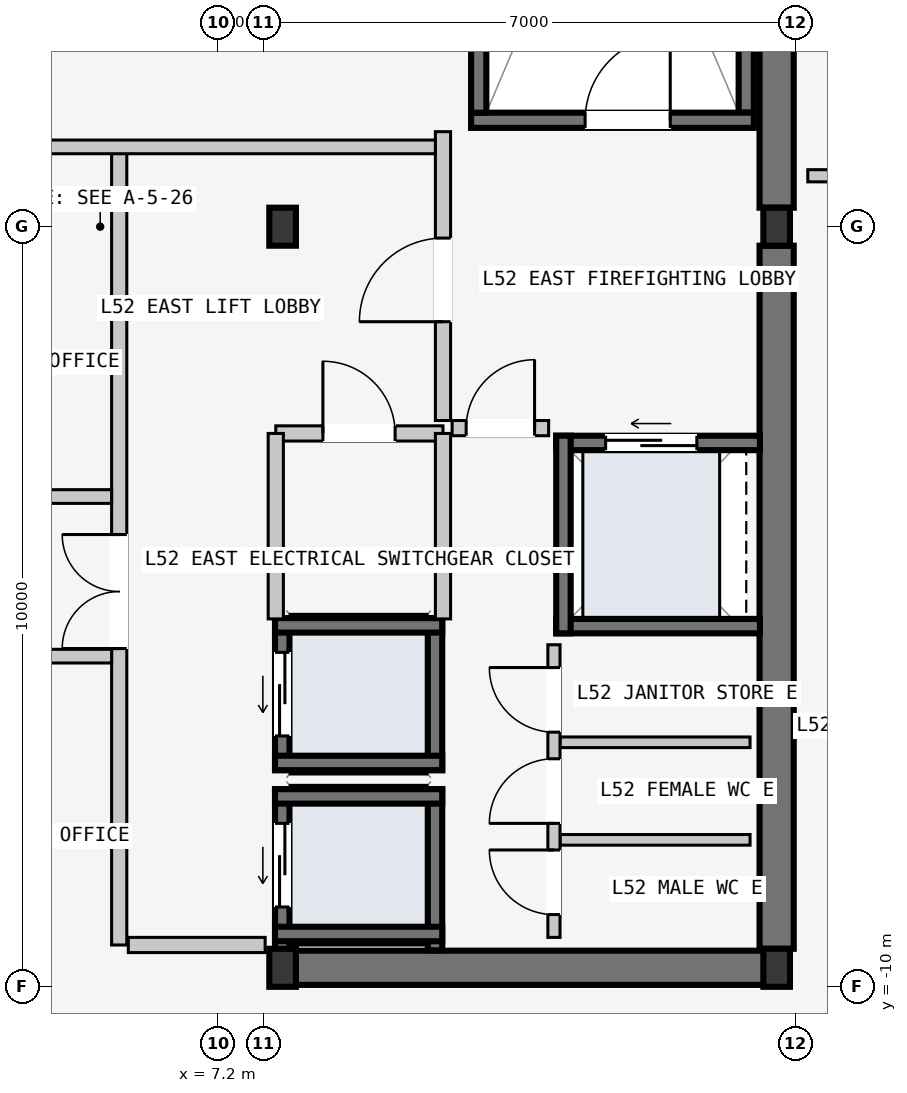
"""IFC4 building model, lengths in metres.
Left out: names, types, materials, properties, quantities, classifications, styles, units other than length and angle.
Written with IfcOpenShell. Run it as: python <this file> out.ifc"""

import sys

from ifc_helpers import new_model, si_unit, direction, frame, frame_2d, origin, origin_2d, place, context, subcontext, project, spatial, rectangle, i_section, extrude, element, fill, save


model = new_model("IFC4")
c1 = context("Model", 3, precision=1e-05, world=origin(), true_north=direction((0.0, 1.0)))
c2 = subcontext(c1, "Body", "Model", "MODEL_VIEW")
j1 = project(units=[si_unit("LENGTHUNIT", "METRE"), si_unit("PLANEANGLEUNIT", "RADIAN")], contexts=[c1])
p1 = place(None, origin())
s1 = spatial("IfcSite", under=j1, at=p1, CompositionType="ELEMENT")
p2 = place(p1, origin())
s2 = spatial("IfcBuilding", under=s1, at=p2, CompositionType="ELEMENT")
p3 = place(p2, frame((0.0, 0.0, 198.3)))
s3 = spatial("IfcBuildingStorey", under=s2, at=p3, CompositionType="ELEMENT", Elevation=198.3)
p4 = place(p3, frame((8.07, -9.75, -0.2), z_axis=(0.0, 0.0, 1.0), x_axis=(1.0, 0.0, 0.0)))
e1 = element("IfcWall", 1, at=p4, inside=s3, PredefinedType="SHEAR", context=c2, shape_type="SweptSolid", body=[
    extrude(rectangle(XDim=6.46, YDim=0.45, at=frame_2d((3.23, 0.0))), origin(), (0.0, 0.0, 1.0), 3.6),
])
for number, where, z_axis, x_axis in (
    (2, (14.55, -9.5, -0.2), (0.0, 0.0, 1.0), (0.0, 1.0, 0.0)),
    (3, (14.55, 0.25, -0.2), (0.0, 0.0, 1.0), (0.0, 1.0, 0.0)),
):
    element("IfcWall", number, at=place(p3, frame(where, z_axis=z_axis, x_axis=x_axis)), inside=s3, PredefinedType="SHEAR", context=c2, shape_type="SweptSolid", body=[
        extrude(rectangle(XDim=9.25, YDim=0.45, at=frame_2d((4.625, 0.0))), origin(), (0.0, 0.0, 1.0), 3.6),
    ])
p5 = place(p3, frame((14.15, 1.5, -0.2), z_axis=(0.0, 0.0, 1.0), x_axis=(0.0, 1.0, 0.0)))
e4 = element("IfcWall", 4, at=p5, inside=s3, PredefinedType="SOLIDWALL", context=c2, shape_type="SweptSolid", body=[
    extrude(rectangle(XDim=7.8, YDim=0.2, at=frame_2d((3.9, 0.0))), origin(), (0.0, 0.0, 1.0), 3.6),
])
p6 = place(p3, frame((10.53, 1.4, -0.2), z_axis=(0.0, 0.0, 1.0), x_axis=(1.0, 0.0, 0.0)))
e5 = element("IfcWall", 5, at=p6, inside=s3, PredefinedType="SOLIDWALL", context=c2, shape_type="SweptSolid", body=[
    extrude(rectangle(XDim=3.72, YDim=0.2, at=frame_2d((1.86, 0.0))), origin(), (0.0, 0.0, 1.0), 3.6),
])
p7 = place(p6, frame((1.5, 0.0, 0.2)))
e6 = element("IfcOpeningElement", 6, at=p7, cuts=e5, PredefinedType="OPENING", context=c2, shape_type="SweptSolid", body=[
    extrude(rectangle(XDim=1.12, YDim=2.18, at=frame_2d((0.56, 1.09))), frame((0.0, 0.11, 0.0), z_axis=(0.0, -1.0, 0.0), x_axis=(1.0, 0.0, 0.0)), (0.0, 0.0, 1.0), 0.22),
])
p8 = place(p3, frame((10.63, 1.5, -0.2), z_axis=(0.0, 0.0, 1.0), x_axis=(0.0, 1.0, 0.0)))
e7 = element("IfcWall", 7, at=p8, inside=s3, PredefinedType="SOLIDWALL", context=c2, shape_type="SweptSolid", body=[
    extrude(rectangle(XDim=7.8, YDim=0.2, at=frame_2d((3.9, 0.0))), origin(), (0.0, 0.0, 1.0), 3.6),
])
for number, where, z_axis, x_axis in (
    (8, (8.05, -9.75, 0.0), (0.0, 0.0, 1.0), (1.0, 0.0, 0.0)),
    (9, (8.05, 0.0, 0.0), (0.0, 0.0, 1.0), (1.0, 0.0, 0.0)),
    (10, (14.55, -9.75, 0.0), (0.0, 0.0, 1.0), (1.0, 0.0, 0.0)),
    (11, (14.55, 0.0, 0.0), (0.0, 0.0, 1.0), (1.0, 0.0, 0.0)),
):
    element("IfcColumn", number, at=place(p3, frame(where, z_axis=z_axis, x_axis=x_axis)), inside=s3, PredefinedType="COLUMN", context=c2, shape_type="SweptSolid", body=[
        extrude(i_section(OverallWidth=0.35, OverallDepth=0.5, WebThickness=0.02, FlangeThickness=0.032, at=origin_2d()), origin(), (0.0, 0.0, 1.0), 3.6),
    ])
p9 = place(p3, frame((8.045, -9.52, -0.2), z_axis=(0.0, 0.0, 1.0), x_axis=(0.0, 1.0, 0.0)))
e12 = element("IfcWall", 12, at=p9, inside=s3, PredefinedType="SOLIDWALL", context=c2, shape_type="SweptSolid", body=[
    extrude(rectangle(XDim=2.12, YDim=0.19, at=frame_2d((1.06, 0.0))), origin(), (0.0, 0.0, 1.0), 3.6),
])
p10 = place(p9, frame((0.57, 0.0, 0.2)))
e13 = element("IfcOpeningElement", 13, at=p10, cuts=e12, PredefinedType="OPENING", context=c2, shape_type="SweptSolid", body=[
    extrude(rectangle(XDim=1.1, YDim=2.2, at=frame_2d((0.55, 1.1))), frame((0.0, 0.105, 0.0), z_axis=(0.0, -1.0, 0.0), x_axis=(1.0, 0.0, 0.0)), (0.0, 0.0, 1.0), 0.21),
])
p11 = place(p3, frame((10.055, -9.52, -0.2), z_axis=(0.0, 0.0, 1.0), x_axis=(0.0, 1.0, 0.0)))
e14 = element("IfcWall", 14, at=p11, inside=s3, PredefinedType="SOLIDWALL", context=c2, shape_type="SweptSolid", body=[
    extrude(rectangle(XDim=2.12, YDim=0.19, at=frame_2d((1.06, 0.0))), origin(), (0.0, 0.0, 1.0), 3.6),
])
for number, where, z_axis, x_axis in (
    (15, (7.95, -7.495, -0.2), (0.0, 0.0, 1.0), (1.0, 0.0, 0.0)),
    (16, (7.95, -9.305, -0.2), (0.0, 0.0, 1.0), (1.0, 0.0, 0.0)),
):
    element("IfcWall", number, at=place(p3, frame(where, z_axis=z_axis, x_axis=x_axis)), inside=s3, PredefinedType="SOLIDWALL", context=c2, shape_type="SweptSolid", body=[
        extrude(rectangle(XDim=2.2, YDim=0.19, at=frame_2d((1.1, 0.0))), origin(), (0.0, 0.0, 1.0), 3.6),
    ])
p12 = place(p3, frame((8.045, -7.15, -0.2), z_axis=(0.0, 0.0, 1.0), x_axis=(0.0, 1.0, 0.0)))
e17 = element("IfcWall", 17, at=p12, inside=s3, PredefinedType="SOLIDWALL", context=c2, shape_type="SweptSolid", body=[
    extrude(rectangle(XDim=2.0, YDim=0.19, at=frame_2d((1.0, 0.0))), origin(), (0.0, 0.0, 1.0), 3.6),
])
p13 = place(p12, frame((0.45, 0.0, 0.2)))
e18 = element("IfcOpeningElement", 18, at=p13, cuts=e17, PredefinedType="OPENING", context=c2, shape_type="SweptSolid", body=[
    extrude(rectangle(XDim=1.1, YDim=2.2, at=frame_2d((0.55, 1.1))), frame((0.0, 0.105, 0.0), z_axis=(0.0, -1.0, 0.0), x_axis=(1.0, 0.0, 0.0)), (0.0, 0.0, 1.0), 0.21),
])
p14 = place(p3, frame((10.055, -7.15, -0.2), z_axis=(0.0, 0.0, 1.0), x_axis=(0.0, 1.0, 0.0)))
e19 = element("IfcWall", 19, at=p14, inside=s3, PredefinedType="SOLIDWALL", context=c2, shape_type="SweptSolid", body=[
    extrude(rectangle(XDim=2.0, YDim=0.19, at=frame_2d((1.0, 0.0))), origin(), (0.0, 0.0, 1.0), 3.6),
])
for number, where, z_axis, x_axis in (
    (20, (7.95, -5.245, -0.2), (0.0, 0.0, 1.0), (1.0, 0.0, 0.0)),
    (21, (7.95, -7.055, -0.2), (0.0, 0.0, 1.0), (1.0, 0.0, 0.0)),
):
    element("IfcWall", number, at=place(p3, frame(where, z_axis=z_axis, x_axis=x_axis)), inside=s3, PredefinedType="SOLIDWALL", context=c2, shape_type="SweptSolid", body=[
        extrude(rectangle(XDim=2.2, YDim=0.19, at=frame_2d((1.1, 0.0))), origin(), (0.0, 0.0, 1.0), 3.6),
    ])
p15 = place(p3, frame((11.65, -2.845, -0.2), z_axis=(0.0, 0.0, 1.0), x_axis=(1.0, 0.0, 0.0)))
e22 = element("IfcWall", 22, at=p15, inside=s3, PredefinedType="SOLIDWALL", context=c2, shape_type="SweptSolid", body=[
    extrude(rectangle(XDim=2.68, YDim=0.19, at=frame_2d((1.34, 0.0))), origin(), (0.0, 0.0, 1.0), 3.6),
])
p16 = place(p15, frame((0.65, 0.0, 0.2)))
e23 = element("IfcOpeningElement", 23, at=p16, cuts=e22, PredefinedType="OPENING", context=c2, shape_type="SweptSolid", body=[
    extrude(rectangle(XDim=1.2, YDim=2.2, at=frame_2d((0.6, 1.1))), frame((0.0, 0.105, 0.0), z_axis=(0.0, -1.0, 0.0), x_axis=(1.0, 0.0, 0.0)), (0.0, 0.0, 1.0), 0.21),
])
p17 = place(p3, frame((11.65, -5.255, -0.2), z_axis=(0.0, 0.0, 1.0), x_axis=(1.0, 0.0, 0.0)))
e24 = element("IfcWall", 24, at=p17, inside=s3, PredefinedType="SOLIDWALL", context=c2, shape_type="SweptSolid", body=[
    extrude(rectangle(XDim=2.68, YDim=0.19, at=frame_2d((1.34, 0.0))), origin(), (0.0, 0.0, 1.0), 3.6),
])
p18 = place(p3, frame((11.745, -5.35, -0.2), z_axis=(0.0, 0.0, 1.0), x_axis=(0.0, 1.0, 0.0)))
e25 = element("IfcWall", 25, at=p18, inside=s3, PredefinedType="SOLIDWALL", context=c2, shape_type="SweptSolid", body=[
    extrude(rectangle(XDim=2.6, YDim=0.19, at=frame_2d((1.3, 0.0))), origin(), (0.0, 0.0, 1.0), 3.6),
])
p19 = place(p3, frame((5.9, -9.45, 0.0), z_axis=(0.0, 0.0, 1.0), x_axis=(0.0, 1.0, 0.0)))
e26 = element("IfcWall", 26, at=p19, inside=s3, PredefinedType="PARTITIONING", context=c2, shape_type="SweptSolid", body=[
    extrude(rectangle(XDim=10.5, YDim=0.2, at=frame_2d((5.25, 0.0))), origin(), (0.0, 0.0, 1.0), 3.4),
])
p20 = place(p19, frame((3.9, 0.0, 0.0)))
e27 = element("IfcOpeningElement", 27, at=p20, cuts=e26, PredefinedType="OPENING", context=c2, shape_type="SweptSolid", body=[
    extrude(rectangle(XDim=1.5, YDim=2.2, at=frame_2d((0.75, 1.1))), frame((0.0, 0.11, 0.0), z_axis=(0.0, -1.0, 0.0), x_axis=(1.0, 0.0, 0.0)), (0.0, 0.0, 1.0), 0.22),
])
p21 = place(p3, frame((6.02, -9.45, 0.0), z_axis=(0.0, 0.0, 1.0), x_axis=(1.0, 0.0, 0.0)))
e28 = element("IfcWall", 28, at=p21, inside=s3, PredefinedType="PARTITIONING", context=c2, shape_type="SweptSolid", body=[
    extrude(rectangle(XDim=1.8, YDim=0.2, at=frame_2d((0.9, 0.0))), origin(), (0.0, 0.0, 1.0), 3.4),
])
p22 = place(p3, frame((10.16, -2.55, 0.0), z_axis=(0.0, 0.0, 1.0), x_axis=(0.0, 1.0, 0.0)))
e29 = element("IfcWall", 29, at=p22, inside=s3, PredefinedType="PARTITIONING", context=c2, shape_type="SweptSolid", body=[
    extrude(rectangle(XDim=3.8, YDim=0.2, at=frame_2d((1.9, 0.0))), origin(), (0.0, 0.0, 1.0), 3.4),
])
p23 = place(p22, frame((1.3, 0.0, 0.0)))
e30 = element("IfcOpeningElement", 30, at=p23, cuts=e29, PredefinedType="OPENING", context=c2, shape_type="SweptSolid", body=[
    extrude(rectangle(XDim=1.1, YDim=2.15, at=frame_2d((0.55, 1.075))), frame((0.0, 0.11, 0.0), z_axis=(0.0, -1.0, 0.0), x_axis=(1.0, 0.0, 0.0)), (0.0, 0.0, 1.0), 0.22),
])
p24 = place(p3, frame((10.28, -2.65, 0.0), z_axis=(0.0, 0.0, 1.0), x_axis=(1.0, 0.0, 0.0)))
e31 = element("IfcWall", 31, at=p24, inside=s3, PredefinedType="PARTITIONING", context=c2, shape_type="SweptSolid", body=[
    extrude(rectangle(XDim=1.27, YDim=0.2, at=frame_2d((0.635, 0.0))), origin(), (0.0, 0.0, 1.0), 3.4),
])
p25 = place(p24, frame((0.185, 0.0, 0.0)))
e32 = element("IfcOpeningElement", 32, at=p25, cuts=e31, PredefinedType="OPENING", context=c2, shape_type="SweptSolid", body=[
    extrude(rectangle(XDim=0.9, YDim=2.15, at=frame_2d((0.45, 1.075))), frame((0.0, 0.11, 0.0), z_axis=(0.0, -1.0, 0.0), x_axis=(1.0, 0.0, 0.0)), (0.0, 0.0, 1.0), 0.22),
])
p26 = place(p3, frame((7.96, -2.72, 0.0), z_axis=(0.0, 0.0, 1.0), x_axis=(1.0, 0.0, 0.0)))
e33 = element("IfcWall", 33, at=p26, inside=s3, PredefinedType="PARTITIONING", context=c2, shape_type="SweptSolid", body=[
    extrude(rectangle(XDim=2.2, YDim=0.2, at=frame_2d((1.1, 0.0))), origin(), (0.0, 0.0, 1.0), 3.4),
])
p27 = place(p26, frame((0.62, 0.0, 0.0)))
e34 = element("IfcOpeningElement", 34, at=p27, cuts=e33, PredefinedType="OPENING", context=c2, shape_type="SweptSolid", body=[
    extrude(rectangle(XDim=0.95, YDim=2.1, at=frame_2d((0.475, 1.05))), frame((0.0, 0.11, 0.0), z_axis=(0.0, -1.0, 0.0), x_axis=(1.0, 0.0, 0.0)), (0.0, 0.0, 1.0), 0.22),
])
for number, where, z_axis, x_axis in (
    (35, (7.96, -5.16, 0.0), (0.0, 0.0, 1.0), (0.0, 1.0, 0.0)),
    (36, (10.16, -5.16, 0.0), (0.0, 0.0, 1.0), (0.0, 1.0, 0.0)),
):
    element("IfcWall", number, at=place(p3, frame(where, z_axis=z_axis, x_axis=x_axis)), inside=s3, PredefinedType="PARTITIONING", context=c2, shape_type="SweptSolid", body=[
        extrude(rectangle(XDim=2.44, YDim=0.2, at=frame_2d((1.22, 0.0))), origin(), (0.0, 0.0, 1.0), 3.4),
    ])
for number, where, z_axis, x_axis in (
    (37, (11.7, -8.067, 0.0), (0.0, 0.0, 1.0), (1.0, 0.0, 0.0)),
    (38, (11.7, -6.783, 0.0), (0.0, 0.0, 1.0), (1.0, 0.0, 0.0)),
):
    element("IfcWall", number, at=place(p3, frame(where, z_axis=z_axis, x_axis=x_axis)), inside=s3, PredefinedType="PARTITIONING", context=c2, shape_type="SweptSolid", body=[
        extrude(rectangle(XDim=2.5, YDim=0.14, at=frame_2d((1.25, 0.0))), origin(), (0.0, 0.0, 1.0), 3.4),
    ])
p28 = place(p3, frame((11.62, -9.35, 0.0), z_axis=(0.0, 0.0, 1.0), x_axis=(0.0, 1.0, 0.0)))
e39 = element("IfcWall", 39, at=p28, inside=s3, PredefinedType="PARTITIONING", context=c2, shape_type="SweptSolid", body=[
    extrude(rectangle(XDim=3.85, YDim=0.16, at=frame_2d((1.925, 0.0))), origin(), (0.0, 0.0, 1.0), 3.4),
])
p29 = place(p28, frame((0.3, 0.0, 0.0)))
e40 = element("IfcOpeningElement", 40, at=p29, cuts=e39, PredefinedType="OPENING", context=c2, shape_type="SweptSolid", body=[
    extrude(rectangle(XDim=0.85, YDim=2.12, at=frame_2d((0.425, 1.06))), frame((0.0, 0.09, 0.0), z_axis=(0.0, -1.0, 0.0), x_axis=(1.0, 0.0, 0.0)), (0.0, 0.0, 1.0), 0.18),
])
p30 = place(p28, frame((1.5, 0.0, 0.0)))
e41 = element("IfcOpeningElement", 41, at=p30, cuts=e39, PredefinedType="OPENING", context=c2, shape_type="SweptSolid", body=[
    extrude(rectangle(XDim=0.85, YDim=2.12, at=frame_2d((0.425, 1.06))), frame((0.0, 0.09, 0.0), z_axis=(0.0, -1.0, 0.0), x_axis=(1.0, 0.0, 0.0)), (0.0, 0.0, 1.0), 0.18),
])
p31 = place(p28, frame((2.7, 0.0, 0.0)))
e42 = element("IfcOpeningElement", 42, at=p31, cuts=e39, PredefinedType="OPENING", context=c2, shape_type="SweptSolid", body=[
    extrude(rectangle(XDim=0.85, YDim=2.12, at=frame_2d((0.425, 1.06))), frame((0.0, 0.09, 0.0), z_axis=(0.0, -1.0, 0.0), x_axis=(1.0, 0.0, 0.0)), (0.0, 0.0, 1.0), 0.18),
])
p32 = place(p3, frame((1.26, 1.05, 0.0), z_axis=(0.0, 0.0, 1.0), x_axis=(1.0, 0.0, 0.0)))
e43 = element("IfcWall", 43, at=p32, inside=s3, PredefinedType="PARTITIONING", context=c2, shape_type="SweptSolid", body=[
    extrude(rectangle(XDim=8.8, YDim=0.18, at=frame_2d((4.4, 0.0))), origin(), (0.0, 0.0, 1.0), 3.4),
])
for number, where, z_axis, x_axis in (
    (44, (1.26, -3.55, 0.0), (0.0, 0.0, 1.0), (1.0, 0.0, 0.0)),
    (45, (1.26, -5.65, 0.0), (0.0, 0.0, 1.0), (1.0, 0.0, 0.0)),
):
    element("IfcWall", number, at=place(p3, frame(where, z_axis=z_axis, x_axis=x_axis)), inside=s3, PredefinedType="PARTITIONING", context=c2, shape_type="SweptSolid", body=[
        extrude(rectangle(XDim=4.54, YDim=0.18, at=frame_2d((2.27, 0.0))), origin(), (0.0, 0.0, 1.0), 3.4),
    ])
p33 = place(p3, frame((14.96, 0.67, 0.0), z_axis=(0.0, 0.0, 1.0), x_axis=(1.0, 0.0, 0.0)))
e46 = element("IfcWall", 46, at=p33, inside=s3, PredefinedType="PARTITIONING", context=c2, shape_type="SweptSolid", body=[
    extrude(rectangle(XDim=4.59, YDim=0.16, at=frame_2d((2.295, 0.0))), origin(), (0.0, 0.0, 1.0), 3.4),
])
p34 = place(p33, frame((0.9, 0.0, 0.0)))
e47 = element("IfcOpeningElement", 47, at=p34, cuts=e46, PredefinedType="OPENING", context=c2, shape_type="SweptSolid", body=[
    extrude(rectangle(XDim=0.96, YDim=2.18, at=frame_2d((0.48, 1.09))), frame((0.0, 0.09, 0.0), z_axis=(0.0, -1.0, 0.0), x_axis=(1.0, 0.0, 0.0)), (0.0, 0.0, 1.0), 0.18),
])
p35 = place(p7, origin())
e48 = element("IfcDoor", 48, at=p35, inside=s3, OperationType="SINGLE_SWING_RIGHT", PredefinedType="DOOR", context=c2, shape_type="SweptSolid", body=[
    extrude(rectangle(XDim=1.12, YDim=2.18, at=frame_2d((0.56, 1.09))), frame((0.0, 0.025, 0.0), z_axis=(0.0, -1.0, 0.0), x_axis=(1.0, 0.0, 0.0)), (0.0, 0.0, 1.0), 0.05),
])
fill(e6, e48)
p36 = place(p10, origin())
e49 = element("IfcDoor", 49, at=p36, inside=s3, OperationType="SLIDING_TO_LEFT", PredefinedType="DOOR", context=c2, shape_type="SweptSolid", body=[
    extrude(rectangle(XDim=1.1, YDim=2.2, at=frame_2d((0.55, 1.1))), frame((0.0, 0.025, 0.0), z_axis=(0.0, -1.0, 0.0), x_axis=(1.0, 0.0, 0.0)), (0.0, 0.0, 1.0), 0.05),
])
fill(e13, e49)
p37 = place(p13, origin())
e50 = element("IfcDoor", 50, at=p37, inside=s3, OperationType="SLIDING_TO_LEFT", PredefinedType="DOOR", context=c2, shape_type="SweptSolid", body=[
    extrude(rectangle(XDim=1.1, YDim=2.2, at=frame_2d((0.55, 1.1))), frame((0.0, 0.025, 0.0), z_axis=(0.0, -1.0, 0.0), x_axis=(1.0, 0.0, 0.0)), (0.0, 0.0, 1.0), 0.05),
])
fill(e18, e50)
p38 = place(p16, origin())
e51 = element("IfcDoor", 51, at=p38, inside=s3, OperationType="SLIDING_TO_LEFT", PredefinedType="DOOR", context=c2, shape_type="SweptSolid", body=[
    extrude(rectangle(XDim=1.2, YDim=2.2, at=frame_2d((0.6, 1.1))), frame((0.0, 0.025, 0.0), z_axis=(0.0, -1.0, 0.0), x_axis=(1.0, 0.0, 0.0)), (0.0, 0.0, 1.0), 0.05),
])
fill(e23, e51)
p39 = place(p20, origin())
e52 = element("IfcDoor", 52, at=p39, inside=s3, OperationType="DOUBLE_DOOR_SINGLE_SWING", PredefinedType="DOOR", context=c2, shape_type="SweptSolid", body=[
    extrude(rectangle(XDim=1.5, YDim=2.2, at=frame_2d((0.75, 1.1))), frame((0.0, 0.025, 0.0), z_axis=(0.0, -1.0, 0.0), x_axis=(1.0, 0.0, 0.0)), (0.0, 0.0, 1.0), 0.05),
])
fill(e27, e52)
p40 = place(p23, origin())
e53 = element("IfcDoor", 53, at=p40, inside=s3, OperationType="SINGLE_SWING_LEFT", PredefinedType="DOOR", context=c2, shape_type="SweptSolid", body=[
    extrude(rectangle(XDim=1.1, YDim=2.15, at=frame_2d((0.55, 1.075))), frame((0.0, 0.025, 0.0), z_axis=(0.0, -1.0, 0.0), x_axis=(1.0, 0.0, 0.0)), (0.0, 0.0, 1.0), 0.05),
])
fill(e30, e53)
p41 = place(p25, origin())
e54 = element("IfcDoor", 54, at=p41, inside=s3, OperationType="SINGLE_SWING_RIGHT", PredefinedType="DOOR", context=c2, shape_type="SweptSolid", body=[
    extrude(rectangle(XDim=0.9, YDim=2.15, at=frame_2d((0.45, 1.075))), frame((0.0, 0.025, 0.0), z_axis=(0.0, -1.0, 0.0), x_axis=(1.0, 0.0, 0.0)), (0.0, 0.0, 1.0), 0.05),
])
fill(e32, e54)
p42 = place(p27, origin())
e55 = element("IfcDoor", 55, at=p42, inside=s3, OperationType="SINGLE_SWING_LEFT", PredefinedType="DOOR", context=c2, shape_type="SweptSolid", body=[
    extrude(rectangle(XDim=0.95, YDim=2.1, at=frame_2d((0.475, 1.05))), frame((0.0, 0.025, 0.0), z_axis=(0.0, -1.0, 0.0), x_axis=(1.0, 0.0, 0.0)), (0.0, 0.0, 1.0), 0.05),
])
fill(e34, e55)
p43 = place(p29, origin())
e56 = element("IfcDoor", 56, at=p43, inside=s3, OperationType="SINGLE_SWING_RIGHT", PredefinedType="DOOR", context=c2, shape_type="SweptSolid", body=[
    extrude(rectangle(XDim=0.85, YDim=2.12, at=frame_2d((0.425, 1.06))), frame((0.0, 0.025, 0.0), z_axis=(0.0, -1.0, 0.0), x_axis=(1.0, 0.0, 0.0)), (0.0, 0.0, 1.0), 0.05),
])
fill(e40, e56)
p44 = place(p30, origin())
e57 = element("IfcDoor", 57, at=p44, inside=s3, OperationType="SINGLE_SWING_LEFT", PredefinedType="DOOR", context=c2, shape_type="SweptSolid", body=[
    extrude(rectangle(XDim=0.85, YDim=2.12, at=frame_2d((0.425, 1.06))), frame((0.0, 0.025, 0.0), z_axis=(0.0, -1.0, 0.0), x_axis=(1.0, 0.0, 0.0)), (0.0, 0.0, 1.0), 0.05),
])
fill(e41, e57)
p45 = place(p31, origin())
e58 = element("IfcDoor", 58, at=p45, inside=s3, OperationType="SINGLE_SWING_RIGHT", PredefinedType="DOOR", context=c2, shape_type="SweptSolid", body=[
    extrude(rectangle(XDim=0.85, YDim=2.12, at=frame_2d((0.425, 1.06))), frame((0.0, 0.025, 0.0), z_axis=(0.0, -1.0, 0.0), x_axis=(1.0, 0.0, 0.0)), (0.0, 0.0, 1.0), 0.05),
])
fill(e42, e58)
save(model, sys.argv[1])
